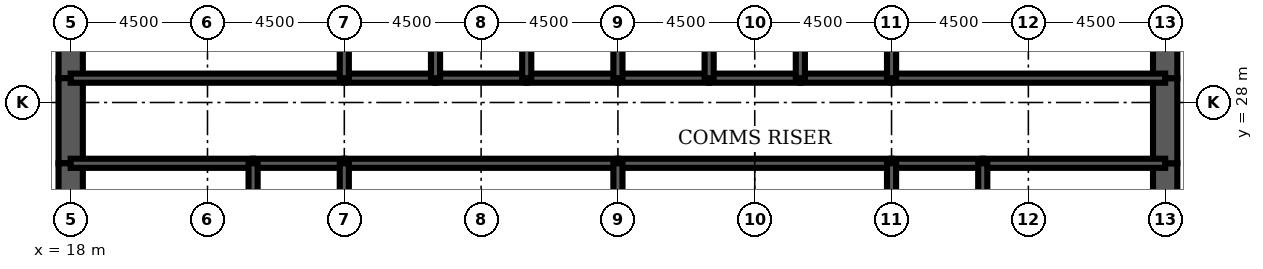
"""IFC4 building model, lengths in metres.
Left out: names, types, materials, properties, quantities, classifications, styles, units other than length and angle.
Written with IfcOpenShell. Run it as: python <this file> out.ifc"""

import sys

from ifc_helpers import new_model, si_unit, direction, frame, frame_2d, origin, place, context, subcontext, project, spatial, rectangle, extrude, element, fill, save


model = new_model("IFC4")
c1 = context("Model", 3, precision=1e-05, world=origin(), true_north=direction((0.0, 1.0)))
c2 = subcontext(c1, "Body", "Model", "MODEL_VIEW")
j1 = project(units=[si_unit("LENGTHUNIT", "METRE"), si_unit("PLANEANGLEUNIT", "RADIAN")], contexts=[c1])
p1 = place(None, origin())
s1 = spatial("IfcSite", under=j1, at=p1, CompositionType="ELEMENT")
p2 = place(p1, origin())
s2 = spatial("IfcBuilding", under=s1, at=p2, CompositionType="ELEMENT")
p3 = place(p2, frame((0.0, 0.0, 223.6)))
s3 = spatial("IfcBuildingStorey", under=s2, at=p3, CompositionType="ELEMENT", Elevation=223.6)
p4 = place(p3, frame((18.0, 32.0, 0.0), z_axis=(0.0, 0.0, 1.0), x_axis=(0.0, -1.0, 0.0)))
e1 = element("IfcWall", 1, at=p4, inside=s3, PredefinedType="SHEAR", context=c2, shape_type="SweptSolid", body=[
    extrude(rectangle(XDim=3.2, YDim=0.8, at=frame_2d((1.6, 0.0))), origin(), (0.0, 0.0, 1.0), 4.2),
])
p5 = place(p3, frame((18.0, 28.8, 0.0), z_axis=(0.0, 0.0, 1.0), x_axis=(0.0, -1.0, 0.0)))
e2 = element("IfcWall", 2, at=p5, inside=s3, PredefinedType="SHEAR", context=c2, shape_type="SweptSolid", body=[
    extrude(rectangle(XDim=2.8, YDim=0.8, at=frame_2d((1.4, 0.0))), origin(), (0.0, 0.0, 1.0), 4.2),
])
p6 = place(p5, frame((0.4, 0.0, 0.0)))
e3 = element("IfcOpeningElement", 3, at=p6, cuts=e2, PredefinedType="OPENING", context=c2, shape_type="SweptSolid", body=[
    extrude(rectangle(XDim=1.8, YDim=2.1, at=frame_2d((0.9, 1.05))), frame((0.0, 0.41, 0.0), z_axis=(0.0, -1.0, 0.0), x_axis=(1.0, 0.0, 0.0)), (0.0, 0.0, 1.0), 0.82),
])
for number, where, z_axis, x_axis in (
    (4, (18.0, 26.0, 0.0), (0.0, 0.0, 1.0), (0.0, -1.0, 0.0)),
    (5, (54.0, 22.0, 0.0), (0.0, 0.0, 1.0), (0.0, 1.0, 0.0)),
):
    element("IfcWall", number, at=place(p3, frame(where, z_axis=z_axis, x_axis=x_axis)), inside=s3, PredefinedType="SHEAR", context=c2, shape_type="SweptSolid", body=[
        extrude(rectangle(XDim=4.0, YDim=0.8, at=frame_2d((2.0, 0.0))), origin(), (0.0, 0.0, 1.0), 4.2),
    ])
p7 = place(p3, frame((54.0, 26.0, 0.0), z_axis=(0.0, 0.0, 1.0), x_axis=(0.0, 1.0, 0.0)))
e6 = element("IfcWall", 6, at=p7, inside=s3, PredefinedType="SHEAR", context=c2, shape_type="SweptSolid", body=[
    extrude(rectangle(XDim=2.8, YDim=0.8, at=frame_2d((1.4, 0.0))), origin(), (0.0, 0.0, 1.0), 4.2),
])
p8 = place(p7, frame((0.6, 0.0, 0.0)))
e7 = element("IfcOpeningElement", 7, at=p8, cuts=e6, PredefinedType="OPENING", context=c2, shape_type="SweptSolid", body=[
    extrude(rectangle(XDim=1.8, YDim=2.1, at=frame_2d((0.9, 1.05))), frame((0.0, 0.41, 0.0), z_axis=(0.0, -1.0, 0.0), x_axis=(1.0, 0.0, 0.0)), (0.0, 0.0, 1.0), 0.82),
])
p9 = place(p3, frame((54.0, 28.8, 0.0), z_axis=(0.0, 0.0, 1.0), x_axis=(0.0, 1.0, 0.0)))
e8 = element("IfcWall", 8, at=p9, inside=s3, PredefinedType="SHEAR", context=c2, shape_type="SweptSolid", body=[
    extrude(rectangle(XDim=3.2, YDim=0.8, at=frame_2d((1.6, 0.0))), origin(), (0.0, 0.0, 1.0), 4.2),
])
p10 = place(p3, frame((18.0, 28.8, 0.0), z_axis=(0.0, 0.0, 1.0), x_axis=(1.0, 0.0, 0.0)))
e9 = element("IfcWall", 9, at=p10, inside=s3, PredefinedType="SOLIDWALL", context=c2, shape_type="SweptSolid", body=[
    extrude(rectangle(XDim=9.0, YDim=0.3, at=frame_2d((4.5, 0.0))), origin(), (0.0, 0.0, 1.0), 4.2),
])
p11 = place(p10, frame((0.65, 0.0, 0.0)))
e10 = element("IfcOpeningElement", 10, at=p11, cuts=e9, PredefinedType="OPENING", context=c2, shape_type="SweptSolid", body=[
    extrude(rectangle(XDim=1.0, YDim=2.1, at=frame_2d((0.5, 1.05))), frame((0.0, 0.16, 0.0), z_axis=(0.0, -1.0, 0.0), x_axis=(1.0, 0.0, 0.0)), (0.0, 0.0, 1.0), 0.32),
])
p12 = place(p3, frame((27.0, 28.8, 0.0), z_axis=(0.0, 0.0, 1.0), x_axis=(1.0, 0.0, 0.0)))
e11 = element("IfcWall", 11, at=p12, inside=s3, PredefinedType="SOLIDWALL", context=c2, shape_type="SweptSolid", body=[
    extrude(rectangle(XDim=3.0, YDim=0.3, at=frame_2d((1.5, 0.0))), origin(), (0.0, 0.0, 1.0), 4.2),
])
p13 = place(p12, frame((0.95, 0.0, 0.0)))
e12 = element("IfcOpeningElement", 12, at=p13, cuts=e11, PredefinedType="OPENING", context=c2, shape_type="SweptSolid", body=[
    extrude(rectangle(XDim=1.1, YDim=2.2, at=frame_2d((0.55, 1.1))), frame((0.0, 0.16, 0.0), z_axis=(0.0, -1.0, 0.0), x_axis=(1.0, 0.0, 0.0)), (0.0, 0.0, 1.0), 0.32),
])
p14 = place(p3, frame((30.0, 28.8, 0.0), z_axis=(0.0, 0.0, 1.0), x_axis=(1.0, 0.0, 0.0)))
e13 = element("IfcWall", 13, at=p14, inside=s3, PredefinedType="SOLIDWALL", context=c2, shape_type="SweptSolid", body=[
    extrude(rectangle(XDim=3.0, YDim=0.3, at=frame_2d((1.5, 0.0))), origin(), (0.0, 0.0, 1.0), 4.2),
])
p15 = place(p14, frame((0.95, 0.0, 0.0)))
e14 = element("IfcOpeningElement", 14, at=p15, cuts=e13, PredefinedType="OPENING", context=c2, shape_type="SweptSolid", body=[
    extrude(rectangle(XDim=1.1, YDim=2.2, at=frame_2d((0.55, 1.1))), frame((0.0, 0.16, 0.0), z_axis=(0.0, -1.0, 0.0), x_axis=(1.0, 0.0, 0.0)), (0.0, 0.0, 1.0), 0.32),
])
p16 = place(p3, frame((33.0, 28.8, 0.0), z_axis=(0.0, 0.0, 1.0), x_axis=(1.0, 0.0, 0.0)))
e15 = element("IfcWall", 15, at=p16, inside=s3, PredefinedType="SOLIDWALL", context=c2, shape_type="SweptSolid", body=[
    extrude(rectangle(XDim=3.0, YDim=0.3, at=frame_2d((1.5, 0.0))), origin(), (0.0, 0.0, 1.0), 4.2),
])
p17 = place(p16, frame((0.95, 0.0, 0.0)))
e16 = element("IfcOpeningElement", 16, at=p17, cuts=e15, PredefinedType="OPENING", context=c2, shape_type="SweptSolid", body=[
    extrude(rectangle(XDim=1.1, YDim=2.2, at=frame_2d((0.55, 1.1))), frame((0.0, 0.16, 0.0), z_axis=(0.0, -1.0, 0.0), x_axis=(1.0, 0.0, 0.0)), (0.0, 0.0, 1.0), 0.32),
])
for number, where, z_axis, x_axis in (
    (17, (36.0, 28.8, 0.0), (0.0, 0.0, 1.0), (1.0, 0.0, 0.0)),
    (18, (39.0, 28.8, 0.0), (0.0, 0.0, 1.0), (1.0, 0.0, 0.0)),
):
    element("IfcWall", number, at=place(p3, frame(where, z_axis=z_axis, x_axis=x_axis)), inside=s3, PredefinedType="SOLIDWALL", context=c2, shape_type="SweptSolid", body=[
        extrude(rectangle(XDim=3.0, YDim=0.3, at=frame_2d((1.5, 0.0))), origin(), (0.0, 0.0, 1.0), 4.2),
    ])
p18 = place(p3, frame((42.0, 28.8, 0.0), z_axis=(0.0, 0.0, 1.0), x_axis=(1.0, 0.0, 0.0)))
e19 = element("IfcWall", 19, at=p18, inside=s3, PredefinedType="SOLIDWALL", context=c2, shape_type="SweptSolid", body=[
    extrude(rectangle(XDim=3.0, YDim=0.3, at=frame_2d((1.5, 0.0))), origin(), (0.0, 0.0, 1.0), 4.2),
])
p19 = place(p18, frame((0.95, 0.0, 0.0)))
e20 = element("IfcOpeningElement", 20, at=p19, cuts=e19, PredefinedType="OPENING", context=c2, shape_type="SweptSolid", body=[
    extrude(rectangle(XDim=1.1, YDim=2.2, at=frame_2d((0.55, 1.1))), frame((0.0, 0.16, 0.0), z_axis=(0.0, -1.0, 0.0), x_axis=(1.0, 0.0, 0.0)), (0.0, 0.0, 1.0), 0.32),
])
p20 = place(p3, frame((45.0, 28.8, 0.0), z_axis=(0.0, 0.0, 1.0), x_axis=(1.0, 0.0, 0.0)))
e21 = element("IfcWall", 21, at=p20, inside=s3, PredefinedType="SOLIDWALL", context=c2, shape_type="SweptSolid", body=[
    extrude(rectangle(XDim=9.0, YDim=0.3, at=frame_2d((4.5, 0.0))), origin(), (0.0, 0.0, 1.0), 4.2),
])
p21 = place(p20, frame((7.35, 0.0, 0.0)))
e22 = element("IfcOpeningElement", 22, at=p21, cuts=e21, PredefinedType="OPENING", context=c2, shape_type="SweptSolid", body=[
    extrude(rectangle(XDim=1.0, YDim=2.1, at=frame_2d((0.5, 1.05))), frame((0.0, 0.16, 0.0), z_axis=(0.0, -1.0, 0.0), x_axis=(1.0, 0.0, 0.0)), (0.0, 0.0, 1.0), 0.32),
])
p22 = place(p3, frame((18.0, 26.0, 0.0), z_axis=(0.0, 0.0, 1.0), x_axis=(1.0, 0.0, 0.0)))
e23 = element("IfcWall", 23, at=p22, inside=s3, PredefinedType="SOLIDWALL", context=c2, shape_type="SweptSolid", body=[
    extrude(rectangle(XDim=6.0, YDim=0.3, at=frame_2d((3.0, 0.0))), origin(), (0.0, 0.0, 1.0), 4.2),
])
p23 = place(p3, frame((24.0, 26.0, 0.0), z_axis=(0.0, 0.0, 1.0), x_axis=(1.0, 0.0, 0.0)))
e24 = element("IfcWall", 24, at=p23, inside=s3, PredefinedType="SOLIDWALL", context=c2, shape_type="SweptSolid", body=[
    extrude(rectangle(XDim=3.0, YDim=0.3, at=frame_2d((1.5, 0.0))), origin(), (0.0, 0.0, 1.0), 4.2),
])
for number, where, z_axis, x_axis in (
    (25, (27.0, 26.0, 0.0), (0.0, 0.0, 1.0), (1.0, 0.0, 0.0)),
    (26, (36.0, 26.0, 0.0), (0.0, 0.0, 1.0), (1.0, 0.0, 0.0)),
):
    element("IfcWall", number, at=place(p3, frame(where, z_axis=z_axis, x_axis=x_axis)), inside=s3, PredefinedType="SOLIDWALL", context=c2, shape_type="SweptSolid", body=[
        extrude(rectangle(XDim=9.0, YDim=0.3, at=frame_2d((4.5, 0.0))), origin(), (0.0, 0.0, 1.0), 4.2),
    ])
p24 = place(p3, frame((45.0, 26.0, 0.0), z_axis=(0.0, 0.0, 1.0), x_axis=(1.0, 0.0, 0.0)))
e27 = element("IfcWall", 27, at=p24, inside=s3, PredefinedType="SOLIDWALL", context=c2, shape_type="SweptSolid", body=[
    extrude(rectangle(XDim=3.0, YDim=0.3, at=frame_2d((1.5, 0.0))), origin(), (0.0, 0.0, 1.0), 4.2),
])
p25 = place(p3, frame((48.0, 26.0, 0.0), z_axis=(0.0, 0.0, 1.0), x_axis=(1.0, 0.0, 0.0)))
e28 = element("IfcWall", 28, at=p25, inside=s3, PredefinedType="SOLIDWALL", context=c2, shape_type="SweptSolid", body=[
    extrude(rectangle(XDim=6.0, YDim=0.3, at=frame_2d((3.0, 0.0))), origin(), (0.0, 0.0, 1.0), 4.2),
])
for number, where, z_axis, x_axis in (
    (29, (27.0, 28.8, 0.0), (0.0, 0.0, 1.0), (0.0, 1.0, 0.0)),
    (30, (30.0, 28.8, 0.0), (0.0, 0.0, 1.0), (0.0, 1.0, 0.0)),
    (31, (33.0, 28.8, 0.0), (0.0, 0.0, 1.0), (0.0, 1.0, 0.0)),
    (32, (36.0, 28.8, 0.0), (0.0, 0.0, 1.0), (0.0, 1.0, 0.0)),
    (33, (39.0, 28.8, 0.0), (0.0, 0.0, 1.0), (0.0, 1.0, 0.0)),
    (34, (42.0, 28.8, 0.0), (0.0, 0.0, 1.0), (0.0, 1.0, 0.0)),
    (35, (45.0, 28.8, 0.0), (0.0, 0.0, 1.0), (0.0, 1.0, 0.0)),
):
    element("IfcWall", number, at=place(p3, frame(where, z_axis=z_axis, x_axis=x_axis)), inside=s3, PredefinedType="SOLIDWALL", context=c2, shape_type="SweptSolid", body=[
        extrude(rectangle(XDim=3.2, YDim=0.3, at=frame_2d((1.6, 0.0))), origin(), (0.0, 0.0, 1.0), 4.2),
    ])
for number, where, z_axis, x_axis in (
    (36, (24.0, 22.0, 0.0), (0.0, 0.0, 1.0), (0.0, 1.0, 0.0)),
    (37, (27.0, 22.0, 0.0), (0.0, 0.0, 1.0), (0.0, 1.0, 0.0)),
    (38, (36.0, 22.0, 0.0), (0.0, 0.0, 1.0), (0.0, 1.0, 0.0)),
    (39, (45.0, 22.0, 0.0), (0.0, 0.0, 1.0), (0.0, 1.0, 0.0)),
    (40, (48.0, 22.0, 0.0), (0.0, 0.0, 1.0), (0.0, 1.0, 0.0)),
):
    element("IfcWall", number, at=place(p3, frame(where, z_axis=z_axis, x_axis=x_axis)), inside=s3, PredefinedType="SOLIDWALL", context=c2, shape_type="SweptSolid", body=[
        extrude(rectangle(XDim=4.0, YDim=0.3, at=frame_2d((2.0, 0.0))), origin(), (0.0, 0.0, 1.0), 4.2),
    ])
p26 = place(p3, frame((42.0, 22.15, 0.0), z_axis=(0.0, 0.0, 1.0), x_axis=(0.0, 1.0, 0.0)))
e41 = element("IfcWall", 41, at=p26, inside=s3, PredefinedType="PARTITIONING", context=c2, shape_type="SweptSolid", body=[
    extrude(rectangle(XDim=3.7, YDim=0.15, at=frame_2d((1.85, 0.0))), origin(), (0.0, 0.0, 1.0), 3.0),
])
p27 = place(p26, frame((2.2, 0.0, 0.0)))
e42 = element("IfcOpeningElement", 42, at=p27, cuts=e41, PredefinedType="OPENING", context=c2, shape_type="SweptSolid", body=[
    extrude(rectangle(XDim=1.0, YDim=2.1, at=frame_2d((0.5, 1.05))), frame((0.0, 0.085, 0.0), z_axis=(0.0, -1.0, 0.0), x_axis=(1.0, 0.0, 0.0)), (0.0, 0.0, 1.0), 0.17),
])
p28 = place(p3, frame((52.025, 22.15, 0.0), z_axis=(0.0, 0.0, 1.0), x_axis=(0.0, 1.0, 0.0)))
e43 = element("IfcWall", 43, at=p28, inside=s3, PredefinedType="PARTITIONING", context=c2, shape_type="SweptSolid", body=[
    extrude(rectangle(XDim=3.7, YDim=0.15, at=frame_2d((1.85, 0.0))), origin(), (0.0, 0.0, 1.0), 3.0),
])
p29 = place(p27, origin())
e44 = element("IfcDoor", 44, at=p29, inside=s3, OperationType="SINGLE_SWING_RIGHT", PredefinedType="DOOR", context=c2, shape_type="SweptSolid", body=[
    extrude(rectangle(XDim=1.0, YDim=2.1, at=frame_2d((0.5, 1.05))), frame((0.0, 0.025, 0.0), z_axis=(0.0, -1.0, 0.0), x_axis=(1.0, 0.0, 0.0)), (0.0, 0.0, 1.0), 0.05),
])
fill(e42, e44)
p30 = place(p19, origin())
e45 = element("IfcDoor", 45, at=p30, inside=s3, OperationType="DOUBLE_DOOR_SLIDING", PredefinedType="USERDEFINED", context=c2, shape_type="SweptSolid", body=[
    extrude(rectangle(XDim=1.1, YDim=2.2, at=frame_2d((0.55, 1.1))), frame((0.0, 0.025, 0.0), z_axis=(0.0, -1.0, 0.0), x_axis=(1.0, 0.0, 0.0)), (0.0, 0.0, 1.0), 0.05),
])
fill(e20, e45)
p31 = place(p13, origin())
e46 = element("IfcDoor", 46, at=p31, inside=s3, OperationType="DOUBLE_DOOR_SLIDING", PredefinedType="USERDEFINED", context=c2, shape_type="SweptSolid", body=[
    extrude(rectangle(XDim=1.1, YDim=2.2, at=frame_2d((0.55, 1.1))), frame((0.0, 0.025, 0.0), z_axis=(0.0, -1.0, 0.0), x_axis=(1.0, 0.0, 0.0)), (0.0, 0.0, 1.0), 0.05),
])
fill(e12, e46)
p32 = place(p15, origin())
e47 = element("IfcDoor", 47, at=p32, inside=s3, OperationType="DOUBLE_DOOR_SLIDING", PredefinedType="USERDEFINED", context=c2, shape_type="SweptSolid", body=[
    extrude(rectangle(XDim=1.1, YDim=2.2, at=frame_2d((0.55, 1.1))), frame((0.0, 0.025, 0.0), z_axis=(0.0, -1.0, 0.0), x_axis=(1.0, 0.0, 0.0)), (0.0, 0.0, 1.0), 0.05),
])
fill(e14, e47)
p33 = place(p17, origin())
e48 = element("IfcDoor", 48, at=p33, inside=s3, OperationType="DOUBLE_DOOR_SLIDING", PredefinedType="USERDEFINED", context=c2, shape_type="SweptSolid", body=[
    extrude(rectangle(XDim=1.1, YDim=2.2, at=frame_2d((0.55, 1.1))), frame((0.0, 0.025, 0.0), z_axis=(0.0, -1.0, 0.0), x_axis=(1.0, 0.0, 0.0)), (0.0, 0.0, 1.0), 0.05),
])
fill(e16, e48)
p34 = place(p11, origin())
e49 = element("IfcDoor", 49, at=p34, inside=s3, OperationType="SINGLE_SWING_LEFT", PredefinedType="DOOR", context=c2, shape_type="SweptSolid", body=[
    extrude(rectangle(XDim=1.0, YDim=2.1, at=frame_2d((0.5, 1.05))), frame((0.0, 0.025, 0.0), z_axis=(0.0, -1.0, 0.0), x_axis=(1.0, 0.0, 0.0)), (0.0, 0.0, 1.0), 0.05),
])
fill(e10, e49)
p35 = place(p21, origin())
e50 = element("IfcDoor", 50, at=p35, inside=s3, OperationType="SINGLE_SWING_RIGHT", PredefinedType="DOOR", context=c2, shape_type="SweptSolid", body=[
    extrude(rectangle(XDim=1.0, YDim=2.1, at=frame_2d((0.5, 1.05))), frame((0.0, 0.025, 0.0), z_axis=(0.0, -1.0, 0.0), x_axis=(1.0, 0.0, 0.0)), (0.0, 0.0, 1.0), 0.05),
])
fill(e22, e50)
p36 = place(p6, origin())
e51 = element("IfcDoor", 51, at=p36, inside=s3, OperationType="SINGLE_SWING_LEFT", PredefinedType="DOOR", context=c2, shape_type="SweptSolid", body=[
    extrude(rectangle(XDim=1.8, YDim=2.1, at=frame_2d((0.9, 1.05))), frame((0.0, 0.4, 0.0), z_axis=(0.0, -1.0, 0.0), x_axis=(1.0, 0.0, 0.0)), (0.0, 0.0, 1.0), 0.8),
])
fill(e3, e51)
p37 = place(p8, origin())
e52 = element("IfcDoor", 52, at=p37, inside=s3, OperationType="SINGLE_SWING_LEFT", PredefinedType="DOOR", context=c2, shape_type="SweptSolid", body=[
    extrude(rectangle(XDim=1.8, YDim=2.1, at=frame_2d((0.9, 1.05))), frame((0.0, 0.4, 0.0), z_axis=(0.0, -1.0, 0.0), x_axis=(1.0, 0.0, 0.0)), (0.0, 0.0, 1.0), 0.8),
])
fill(e7, e52)
save(model, sys.argv[1])
